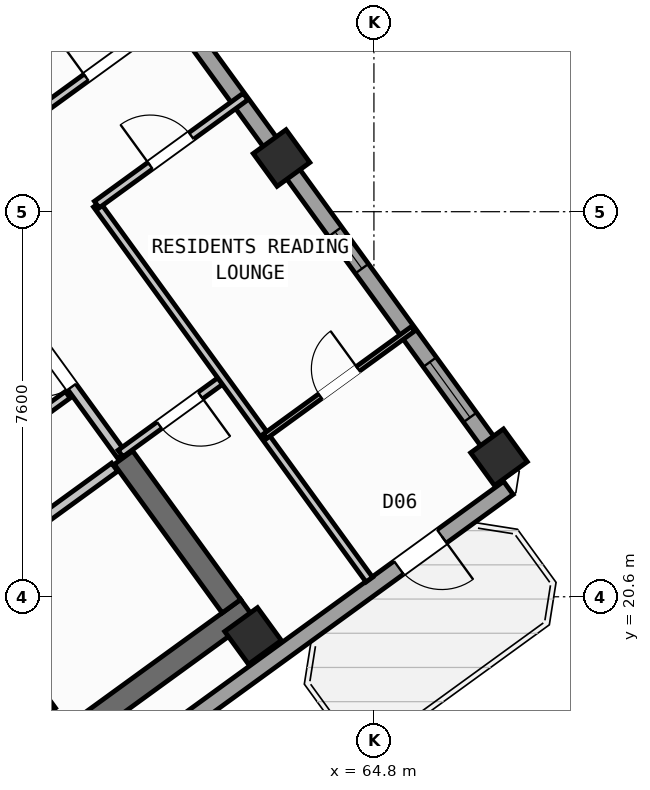
"""IFC4 building model, lengths in metres.
Left out: names, types, materials, properties, quantities, classifications, styles, units other than length and angle.
Written with IfcOpenShell. Run it as: python <this file> out.ifc"""

import sys

from ifc_helpers import new_model, si_unit, direction, frame, frame_2d, origin, origin_2d, place, context, subcontext, project, spatial, rectangle, hollow_rectangle, extrude, source, transform, mapped, element, fill, save


model = new_model("IFC4")
c1 = context("Model", 3, precision=1e-05, world=origin(), true_north=direction((0.0, 1.0)))
c2 = subcontext(c1, "Body", "Model", "MODEL_VIEW")
j1 = project(units=[si_unit("LENGTHUNIT", "METRE"), si_unit("PLANEANGLEUNIT", "RADIAN")], contexts=[c1])
p1 = place(None, origin())
s1 = spatial("IfcSite", under=j1, at=p1, CompositionType="ELEMENT")
p2 = place(p1, origin())
s2 = spatial("IfcBuilding", under=s1, at=p2, CompositionType="ELEMENT")
p3 = place(p2, frame((0.0, 0.0, 214.8)))
s3 = spatial("IfcBuildingStorey", under=s2, at=p3, CompositionType="ELEMENT", Elevation=214.8)
p4 = place(p3, frame((52.399, 13.169, 0.0), z_axis=(0.0, 0.0, 1.0), x_axis=(0.809022352778, 0.587777877013, 0.0)))
e1 = element("IfcWall", 1, at=p4, inside=s3, PredefinedType="SHEAR", context=c2, shape_type="SweptSolid", body=[
    extrude(rectangle(XDim=12.24, YDim=0.45, at=frame_2d((6.12, 0.0))), origin(), (0.0, 0.0, 1.0), 3.35),
])
p5 = place(p3, frame((61.988, 20.413, 0.0), z_axis=(0.0, 0.0, 1.0), x_axis=(-0.587819244441, 0.808992296542, 0.0)))
e2 = element("IfcWall", 2, at=p5, inside=s3, PredefinedType="SHEAR", context=c2, shape_type="SweptSolid", body=[
    extrude(rectangle(XDim=3.625, YDim=0.45, at=frame_2d((1.812, 0.0))), origin(), (0.0, 0.0, 1.0), 3.35),
])
m1 = source(origin(), c2, "Body", "SweptSolid", [
    extrude(hollow_rectangle(XDim=0.8, YDim=0.8, WallThickness=0.032, at=origin_2d()), origin(), (0.0, 0.0, 1.0), 3.6),
])
for number, where, z_axis, x_axis in (
    (3, (62.414, 19.827, 0.0), (0.0, 0.0, 1.0), (0.809, 0.588, 0.0)),
    (4, (67.268, 23.354, 0.0), (0.0, 0.0, 1.0), (0.809, 0.588, 0.0)),
    (5, (62.977, 29.259, 0.0), (0.0, 0.0, 1.0), (0.809, 0.588, 0.0)),
):
    element("IfcColumn", number, at=place(p3, frame(where, z_axis=z_axis, x_axis=x_axis)), inside=s3, PredefinedType="COLUMN", context=c2, shape_type="MappedRepresentation", body=[
        mapped(m1, transform((0.0, 0.0, 0.0), scale=1.0)),
    ])
p6 = place(p3, frame((54.81, 40.5, 0.0), z_axis=(0.0, 0.0, 1.0), x_axis=(0.587783625747, -0.809018176127, 0.0)))
e6 = element("IfcWall", 6, at=p6, inside=s3, PredefinedType="STANDARD", context=c2, shape_type="SweptSolid", body=[
    extrude(rectangle(XDim=21.587, YDim=0.32, at=frame_2d((10.794, 0.0))), origin(), (0.0, 0.0, 1.0), 2.825),
])
p7 = place(p6, frame((1.403, 0.0, 0.9)))
e7 = element("IfcOpeningElement", 7, at=p7, cuts=e6, PredefinedType="OPENING", context=c2, shape_type="SweptSolid", body=[
    extrude(rectangle(XDim=1.65, YDim=1.45, at=frame_2d((0.825, 0.725))), frame((0.0, 0.17, 0.0), z_axis=(0.0, -1.0, 0.0), x_axis=(1.0, 0.0, 0.0)), (0.0, 0.0, 1.0), 0.34),
])
p8 = place(p6, frame((4.695, 0.0, 1.0)))
e8 = element("IfcOpeningElement", 8, at=p8, cuts=e6, PredefinedType="OPENING", context=c2, shape_type="SweptSolid", body=[
    extrude(rectangle(XDim=0.9, YDim=1.25, at=frame_2d((0.45, 0.625))), frame((0.0, 0.17, 0.0), z_axis=(0.0, -1.0, 0.0), x_axis=(1.0, 0.0, 0.0)), (0.0, 0.0, 1.0), 0.34),
])
p9 = place(p6, frame((7.604, 0.0, 0.95)))
e9 = element("IfcOpeningElement", 9, at=p9, cuts=e6, PredefinedType="OPENING", context=c2, shape_type="SweptSolid", body=[
    extrude(rectangle(XDim=1.95, YDim=1.35, at=frame_2d((0.975, 0.675))), frame((0.0, 0.17, 0.0), z_axis=(0.0, -1.0, 0.0), x_axis=(1.0, 0.0, 0.0)), (0.0, 0.0, 1.0), 0.34),
])
p10 = place(p6, frame((15.692, 0.0, 1.0)))
e10 = element("IfcOpeningElement", 10, at=p10, cuts=e6, PredefinedType="OPENING", context=c2, shape_type="SweptSolid", body=[
    extrude(rectangle(XDim=0.9, YDim=1.25, at=frame_2d((0.45, 0.625))), frame((0.0, 0.17, 0.0), z_axis=(0.0, -1.0, 0.0), x_axis=(1.0, 0.0, 0.0)), (0.0, 0.0, 1.0), 0.34),
])
p11 = place(p6, frame((18.872, 0.0, 0.9)))
e11 = element("IfcOpeningElement", 11, at=p11, cuts=e6, PredefinedType="OPENING", context=c2, shape_type="SweptSolid", body=[
    extrude(rectangle(XDim=1.35, YDim=1.45, at=frame_2d((0.675, 0.725))), frame((0.0, 0.17, 0.0), z_axis=(0.0, -1.0, 0.0), x_axis=(1.0, 0.0, 0.0)), (0.0, 0.0, 1.0), 0.34),
])
p12 = place(p3, frame((67.454, 22.747, 0.0), z_axis=(0.0, 0.0, 1.0), x_axis=(-0.809021120468, -0.587779573171, 0.0)))
e12 = element("IfcWall", 12, at=p12, inside=s3, PredefinedType="STANDARD", context=c2, shape_type="SweptSolid", body=[
    extrude(rectangle(XDim=17.588, YDim=0.32, at=frame_2d((8.794, 0.0))), origin(), (0.0, 0.0, 1.0), 3.35),
])
p13 = place(p12, frame((1.624, 0.0, 0.0)))
e13 = element("IfcOpeningElement", 13, at=p13, cuts=e12, PredefinedType="OPENING", context=c2, shape_type="SweptSolid", body=[
    extrude(rectangle(XDim=1.05, YDim=2.15, at=frame_2d((0.525, 1.075))), frame((0.0, 0.17, 0.0), z_axis=(0.0, -1.0, 0.0), x_axis=(1.0, 0.0, 0.0)), (0.0, 0.0, 1.0), 0.34),
])
p14 = place(p12, frame((8.344, 0.0, 0.9)))
e14 = element("IfcOpeningElement", 14, at=p14, cuts=e12, PredefinedType="OPENING", context=c2, shape_type="SweptSolid", body=[
    extrude(rectangle(XDim=1.65, YDim=1.45, at=frame_2d((0.825, 0.725))), frame((0.0, 0.17, 0.0), z_axis=(0.0, -1.0, 0.0), x_axis=(1.0, 0.0, 0.0)), (0.0, 0.0, 1.0), 0.34),
])
p15 = place(p12, frame((13.594, 0.0, 0.9)))
e15 = element("IfcOpeningElement", 15, at=p15, cuts=e12, PredefinedType="OPENING", context=c2, shape_type="SweptSolid", body=[
    extrude(rectangle(XDim=1.65, YDim=1.45, at=frame_2d((0.825, 0.725))), frame((0.0, 0.17, 0.0), z_axis=(0.0, -1.0, 0.0), x_axis=(1.0, 0.0, 0.0)), (0.0, 0.0, 1.0), 0.34),
])
p16 = place(p3, frame((52.472, 14.013, 0.0), z_axis=(0.0, 0.0, 1.0), x_axis=(0.809028366311, 0.587769599847, 0.0)))
e16 = element("IfcWall", 16, at=p16, inside=s3, PredefinedType="SHEAR", context=c2, shape_type="SweptSolid", body=[
    extrude(rectangle(XDim=7.33, YDim=0.26, at=frame_2d((3.665, 0.0))), origin(), (0.0, 0.0, 1.0), 3.35),
])
p17 = place(p3, frame((58.41, 18.327, 0.0), z_axis=(0.0, 0.0, 1.0), x_axis=(-0.58776738483, 0.809029975545, 0.0)))
e17 = element("IfcWall", 17, at=p17, inside=s3, PredefinedType="SHEAR", context=c2, shape_type="SweptSolid", body=[
    extrude(rectangle(XDim=3.16, YDim=0.26, at=frame_2d((1.58, 0.0))), origin(), (0.0, 0.0, 1.0), 3.35),
])
p18 = place(p3, frame((56.553, 20.884, 0.0), z_axis=(0.0, 0.0, 1.0), x_axis=(0.809041669066, 0.587751288995, 0.0)))
e18 = element("IfcWall", 18, at=p18, inside=s3, PredefinedType="STANDARD", context=c2, shape_type="SweptSolid", body=[
    extrude(rectangle(XDim=3.868, YDim=0.2, at=frame_2d((1.934, 0.0))), origin(), (0.0, 0.0, 1.0), 3.34),
])
p19 = place(p18, frame((0.55, 0.0, 0.0)))
e19 = element("IfcOpeningElement", 19, at=p19, cuts=e18, PredefinedType="OPENING", context=c2, shape_type="SweptSolid", body=[
    extrude(rectangle(XDim=0.86, YDim=2.05, at=frame_2d((0.43, 1.025))), frame((0.0, 0.11, 0.0), z_axis=(0.0, -1.0, 0.0), x_axis=(1.0, 0.0, 0.0)), (0.0, 0.0, 1.0), 0.22),
])
p20 = place(p3, frame((54.421, 21.436, 0.0), z_axis=(0.0, 0.0, 1.0), x_axis=(0.809013710463, 0.587789772183, 0.0)))
e20 = element("IfcWall", 20, at=p20, inside=s3, PredefinedType="PARTITIONING", context=c2, shape_type="SweptSolid", body=[
    extrude(rectangle(XDim=5.36, YDim=0.16, at=frame_2d((2.68, 0.0))), origin(), (0.0, 0.0, 1.0), 3.34),
])
p21 = place(p20, frame((1.4, 0.0, 0.0)))
e21 = element("IfcOpeningElement", 21, at=p21, cuts=e20, PredefinedType="OPENING", context=c2, shape_type="SweptSolid", body=[
    extrude(rectangle(XDim=0.86, YDim=2.05, at=frame_2d((0.43, 1.025))), frame((0.0, 0.09, 0.0), z_axis=(0.0, -1.0, 0.0), x_axis=(1.0, 0.0, 0.0)), (0.0, 0.0, 1.0), 0.18),
])
p22 = place(p3, frame((59.827, 23.386, 0.0), z_axis=(0.0, 0.0, 1.0), x_axis=(-0.587803840107, 0.809003489211, 0.0)))
e22 = element("IfcWall", 22, at=p22, inside=s3, PredefinedType="STANDARD", context=c2, shape_type="SweptSolid", body=[
    extrude(rectangle(XDim=2.96, YDim=0.2, at=frame_2d((1.48, 0.0))), origin(), (0.0, 0.0, 1.0), 3.34),
])
p23 = place(p22, frame((1.68, 0.0, 0.0)))
e23 = element("IfcOpeningElement", 23, at=p23, cuts=e22, PredefinedType="OPENING", context=c2, shape_type="SweptSolid", body=[
    extrude(rectangle(XDim=1.0, YDim=2.1, at=frame_2d((0.5, 1.05))), frame((0.0, 0.11, 0.0), z_axis=(0.0, -1.0, 0.0), x_axis=(1.0, 0.0, 0.0)), (0.0, 0.0, 1.0), 0.22),
])
p24 = place(p3, frame((59.798, 23.427, 0.0), z_axis=(0.0, 0.0, 1.0), x_axis=(0.809034604122, 0.587761013791, 0.0)))
e24 = element("IfcWall", 24, at=p24, inside=s3, PredefinedType="PARTITIONING", context=c2, shape_type="SweptSolid", body=[
    extrude(rectangle(XDim=2.51, YDim=0.16, at=frame_2d((1.255, 0.0))), origin(), (0.0, 0.0, 1.0), 3.34),
])
p25 = place(p24, frame((0.95, 0.0, 0.0)))
e25 = element("IfcOpeningElement", 25, at=p25, cuts=e24, PredefinedType="OPENING", context=c2, shape_type="SweptSolid", body=[
    extrude(rectangle(XDim=1.0, YDim=2.1, at=frame_2d((0.5, 1.05))), frame((0.0, 0.09, 0.0), z_axis=(0.0, -1.0, 0.0), x_axis=(1.0, 0.0, 0.0)), (0.0, 0.0, 1.0), 0.18),
])
p26 = place(p3, frame((64.709, 20.938, 0.0), z_axis=(0.0, 0.0, 1.0), x_axis=(-0.587776590479, 0.80902328748, 0.0)))
e26 = element("IfcWall", 26, at=p26, inside=s3, PredefinedType="PARTITIONING", context=c2, shape_type="SweptSolid", body=[
    extrude(rectangle(XDim=9.15, YDim=0.16, at=frame_2d((4.575, 0.0))), origin(), (0.0, 0.0, 1.0), 3.34),
])
p27 = place(p3, frame((59.331, 28.341, 0.0), z_axis=(0.0, 0.0, 1.0), x_axis=(0.809003564202, 0.587803736896, 0.0)))
e27 = element("IfcWall", 27, at=p27, inside=s3, PredefinedType="PARTITIONING", context=c2, shape_type="SweptSolid", body=[
    extrude(rectangle(XDim=3.63, YDim=0.16, at=frame_2d((1.815, 0.0))), origin(), (0.0, 0.0, 1.0), 3.34),
])
p28 = place(p27, frame((1.305, 0.0, 0.0)))
e28 = element("IfcOpeningElement", 28, at=p28, cuts=e27, PredefinedType="OPENING", context=c2, shape_type="SweptSolid", body=[
    extrude(rectangle(XDim=1.0, YDim=2.1, at=frame_2d((0.5, 1.05))), frame((0.0, 0.09, 0.0), z_axis=(0.0, -1.0, 0.0), x_axis=(1.0, 0.0, 0.0)), (0.0, 0.0, 1.0), 0.18),
])
p29 = place(p3, frame((58.067, 30.08, 0.0), z_axis=(0.0, 0.0, 1.0), x_axis=(0.809012309495, 0.587791700422, 0.0)))
e29 = element("IfcWall", 29, at=p29, inside=s3, PredefinedType="PARTITIONING", context=c2, shape_type="SweptSolid", body=[
    extrude(rectangle(XDim=3.63, YDim=0.16, at=frame_2d((1.815, 0.0))), origin(), (0.0, 0.0, 1.0), 3.34),
])
p30 = place(p29, frame((1.305, 0.0, 0.0)))
e30 = element("IfcOpeningElement", 30, at=p30, cuts=e29, PredefinedType="OPENING", context=c2, shape_type="SweptSolid", body=[
    extrude(rectangle(XDim=1.0, YDim=2.1, at=frame_2d((0.5, 1.05))), frame((0.0, 0.09, 0.0), z_axis=(0.0, -1.0, 0.0), x_axis=(1.0, 0.0, 0.0)), (0.0, 0.0, 1.0), 0.18),
])
p31 = place(p3, frame((62.653, 23.768, 0.0), z_axis=(0.0, 0.0, 1.0), x_axis=(0.809037198293, 0.58775744298, 0.0)))
e31 = element("IfcWall", 31, at=p31, inside=s3, PredefinedType="PARTITIONING", context=c2, shape_type="SweptSolid", body=[
    extrude(rectangle(XDim=3.61, YDim=0.11, at=frame_2d((1.805, 0.0))), origin(), (0.0, 0.0, 1.0), 3.34),
])
p32 = place(p31, frame((1.345, 0.0, 0.0)))
e32 = element("IfcOpeningElement", 32, at=p32, cuts=e31, PredefinedType="OPENING", context=c2, shape_type="SweptSolid", body=[
    extrude(rectangle(XDim=0.92, YDim=2.08, at=frame_2d((0.46, 1.04))), frame((0.0, 0.065, 0.0), z_axis=(0.0, -1.0, 0.0), x_axis=(1.0, 0.0, 0.0)), (0.0, 0.0, 1.0), 0.13),
])
m2 = source(origin(), c2, "Body", "SweptSolid", [
    extrude(rectangle(XDim=1.05, YDim=2.15, at=frame_2d((0.525, 1.075))), frame((0.0, 0.025, 0.0), z_axis=(0.0, -1.0, 0.0), x_axis=(1.0, 0.0, 0.0)), (0.0, 0.0, 1.0), 0.05),
])
p33 = place(p13, origin())
e33 = element("IfcDoor", 33, at=p33, inside=s3, OperationType="SINGLE_SWING_LEFT", PredefinedType="DOOR", context=c2, shape_type="MappedRepresentation", body=[
    mapped(m2, transform((0.0, 0.0, 0.0), scale=1.0)),
])
fill(e13, e33)
m3 = source(origin(), c2, "Body", "SweptSolid", [
    extrude(rectangle(XDim=0.9, YDim=1.25, at=frame_2d((0.45, 0.625))), frame((0.0, 0.03, 0.0), z_axis=(0.0, -1.0, 0.0), x_axis=(1.0, 0.0, 0.0)), (0.0, 0.0, 1.0), 0.06),
])
p34 = place(p10, origin())
e34 = element("IfcWindow", 34, at=p34, inside=s3, PartitioningType="SINGLE_PANEL", PredefinedType="WINDOW", context=c2, shape_type="MappedRepresentation", body=[
    mapped(m3, transform((0.0, 0.0, 0.0), scale=1.0)),
])
fill(e10, e34)
m4 = source(origin(), c2, "Body", "SweptSolid", [
    extrude(rectangle(XDim=1.35, YDim=1.45, at=frame_2d((0.675, 0.725))), frame((0.0, 0.03, 0.0), z_axis=(0.0, -1.0, 0.0), x_axis=(1.0, 0.0, 0.0)), (0.0, 0.0, 1.0), 0.06),
])
p35 = place(p11, origin())
e35 = element("IfcWindow", 35, at=p35, inside=s3, PartitioningType="SINGLE_PANEL", PredefinedType="WINDOW", context=c2, shape_type="MappedRepresentation", body=[
    mapped(m4, transform((0.0, 0.0, 0.0), scale=1.0)),
])
fill(e11, e35)
m5 = source(origin(), c2, "Body", "SweptSolid", [
    extrude(rectangle(XDim=1.0, YDim=2.1, at=frame_2d((0.5, 1.05))), frame((0.0, 0.025, 0.0), z_axis=(0.0, -1.0, 0.0), x_axis=(1.0, 0.0, 0.0)), (0.0, 0.0, 1.0), 0.05),
])
p36 = place(p25, frame((1.0, 0.0, 0.0), z_axis=(0.0, 0.0, 1.0), x_axis=(-1.0, 0.0, 0.0)))
e36 = element("IfcDoor", 36, at=p36, inside=s3, OperationType="SINGLE_SWING_LEFT", PredefinedType="DOOR", context=c2, shape_type="MappedRepresentation", body=[
    mapped(m5, transform((0.0, 0.0, 0.0), scale=1.0)),
])
fill(e25, e36)
p37 = place(p23, origin())
e37 = element("IfcDoor", 37, at=p37, inside=s3, OperationType="SINGLE_SWING_RIGHT", PredefinedType="DOOR", context=c2, shape_type="MappedRepresentation", body=[
    mapped(m5, transform((0.0, 0.0, 0.0), scale=1.0)),
])
fill(e23, e37)
p38 = place(p30, origin())
e38 = element("IfcDoor", 38, at=p38, inside=s3, OperationType="SINGLE_SWING_LEFT", PredefinedType="DOOR", context=c2, shape_type="MappedRepresentation", body=[
    mapped(m5, transform((0.0, 0.0, 0.0), scale=1.0)),
])
fill(e30, e38)
p39 = place(p28, origin())
e39 = element("IfcDoor", 39, at=p39, inside=s3, OperationType="SINGLE_SWING_LEFT", PredefinedType="DOOR", context=c2, shape_type="MappedRepresentation", body=[
    mapped(m5, transform((0.0, 0.0, 0.0), scale=1.0)),
])
fill(e28, e39)
m6 = source(origin(), c2, "Body", "SweptSolid", [
    extrude(rectangle(XDim=0.92, YDim=2.08, at=frame_2d((0.46, 1.04))), frame((0.0, 0.025, 0.0), z_axis=(0.0, -1.0, 0.0), x_axis=(1.0, 0.0, 0.0)), (0.0, 0.0, 1.0), 0.05),
])
p40 = place(p32, origin())
e40 = element("IfcDoor", 40, at=p40, inside=s3, OperationType="SINGLE_SWING_RIGHT", PredefinedType="DOOR", context=c2, shape_type="MappedRepresentation", body=[
    mapped(m6, transform((0.0, 0.0, 0.0), scale=1.0)),
])
fill(e32, e40)
save(model, sys.argv[1])
